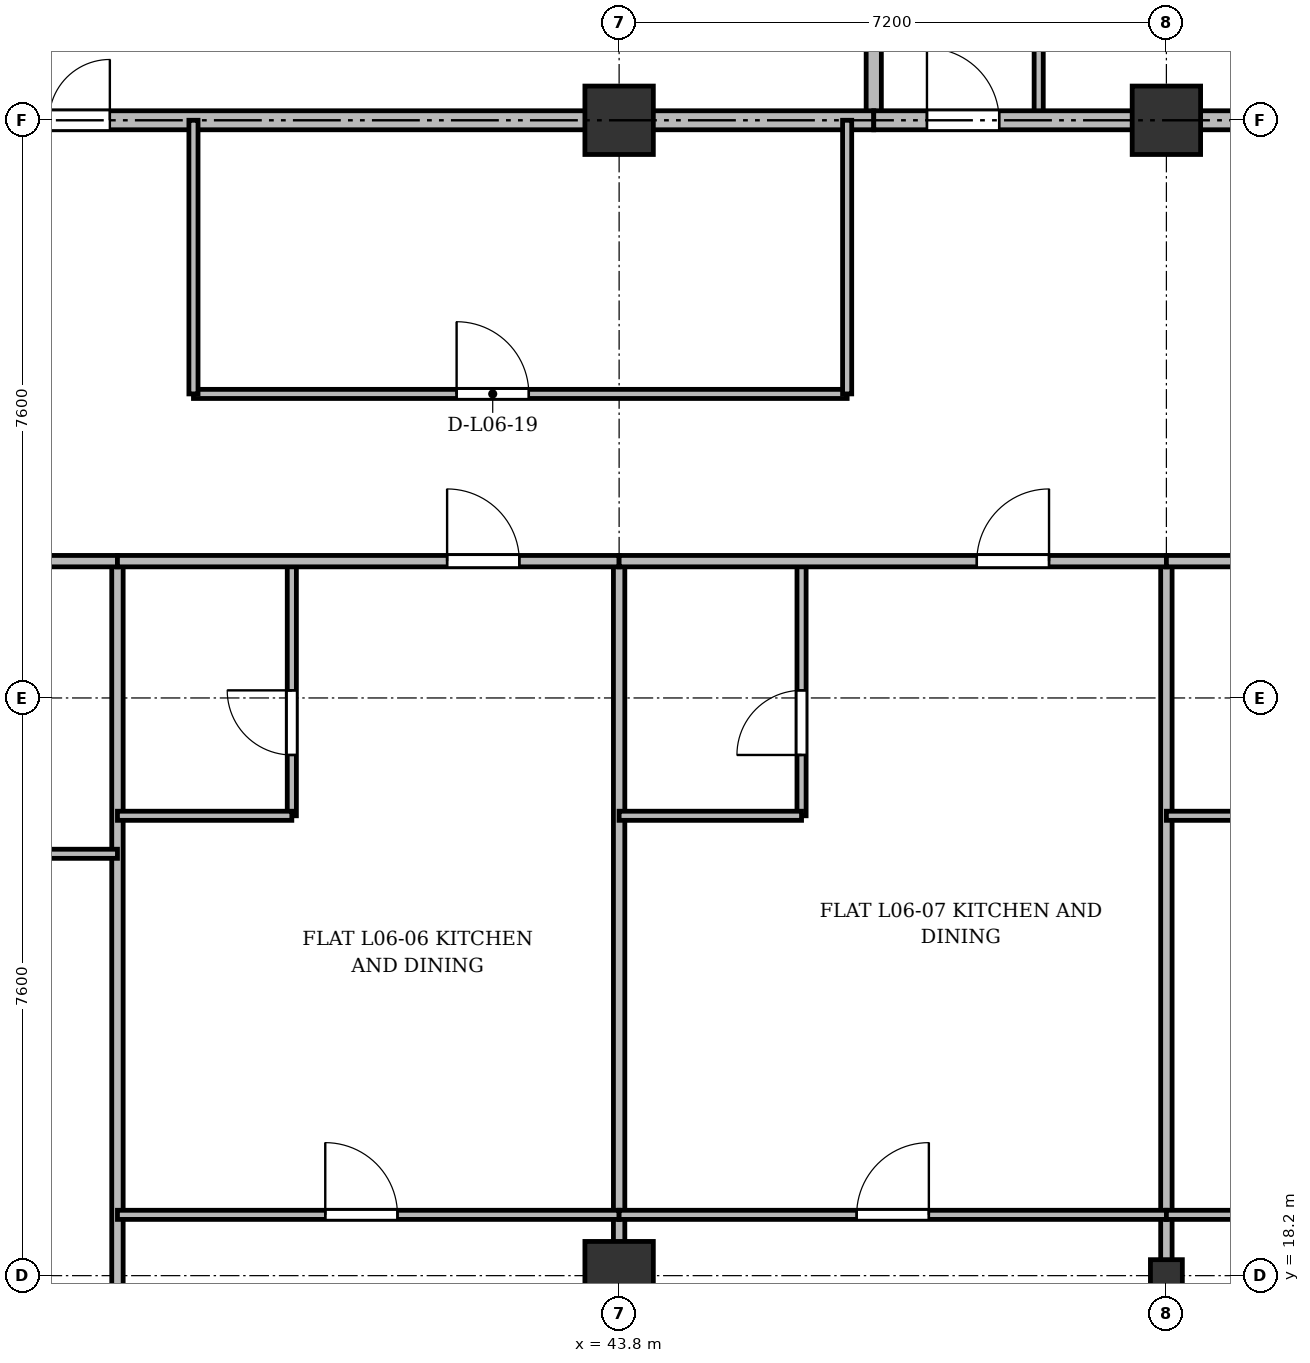
"""IFC4 building model, lengths in metres.
Left out: names, types, materials, properties, quantities, classifications, styles, units other than length and angle.
Written with IfcOpenShell. Run it as: python <this file> out.ifc"""

import sys

from ifc_helpers import new_model, si_unit, direction, frame, frame_2d, origin, origin_2d, place, context, subcontext, project, spatial, rectangle, i_section, extrude, source, transform, mapped, element, fill, save


model = new_model("IFC4")
c1 = context("Model", 3, precision=1e-05, world=origin(), true_north=direction((0.0, 1.0)))
c2 = subcontext(c1, "Body", "Model", "MODEL_VIEW")
j1 = project(units=[si_unit("LENGTHUNIT", "METRE"), si_unit("PLANEANGLEUNIT", "RADIAN")], contexts=[c1])
p1 = place(None, origin())
s1 = spatial("IfcSite", under=j1, at=p1, CompositionType="ELEMENT")
p2 = place(p1, origin())
s2 = spatial("IfcBuilding", under=s1, at=p2, CompositionType="ELEMENT")
p3 = place(p2, frame((0.0, 0.0, 27.1)))
s3 = spatial("IfcBuildingStorey", under=s2, at=p3, CompositionType="ELEMENT", Elevation=27.1)
m1 = source(origin(), c2, "Body", "SweptSolid", [
    extrude(rectangle(XDim=0.9, YDim=0.9, at=origin_2d()), origin(), (0.0, 0.0, 1.0), 3.6),
])
for number, where, z_axis, x_axis in (
    (1, (43.8, 18.2, 0.0), (0.0, 0.0, 1.0), (1.0, 0.0, 0.0)),
    (2, (43.8, 33.4, 0.0), (0.0, 0.0, 1.0), (1.0, 0.0, 0.0)),
):
    element("IfcColumn", number, at=place(p3, frame(where, z_axis=z_axis, x_axis=x_axis)), inside=s3, PredefinedType="COLUMN", context=c2, shape_type="MappedRepresentation", body=[
        mapped(m1, transform((0.0, 0.0, 0.0), x_axis=(1.0, 0.0, 0.0), y_axis=(0.0, 1.0, 0.0), z_axis=(0.0, 0.0, 1.0), scale=1.0)),
    ])
m2 = source(origin(), c2, "Body", "SweptSolid", [
    extrude(i_section(OverallWidth=0.42, OverallDepth=0.42, WebThickness=0.026, FlangeThickness=0.04, at=origin_2d()), origin(), (0.0, 0.0, 1.0), 3.6),
])
p4 = place(p3, frame((51.0, 18.2, 0.0), z_axis=(0.0, 0.0, 1.0), x_axis=(1.0, 0.0, 0.0)))
e3 = element("IfcColumn", 3, at=p4, inside=s3, PredefinedType="COLUMN", context=c2, shape_type="MappedRepresentation", body=[
    mapped(m2, transform((0.0, 0.0, 0.0), x_axis=(1.0, 0.0, 0.0), y_axis=(0.0, 1.0, 0.0), z_axis=(0.0, 0.0, 1.0), scale=1.0)),
])
p5 = place(p3, frame((51.0, 33.4, 0.0), z_axis=(0.0, 0.0, 1.0), x_axis=(1.0, 0.0, 0.0)))
e4 = element("IfcColumn", 4, at=p5, inside=s3, PredefinedType="COLUMN", context=c2, shape_type="MappedRepresentation", body=[
    mapped(m1, transform((0.0, 0.0, 0.0), x_axis=(1.0, 0.0, 0.0), y_axis=(0.0, 1.0, 0.0), z_axis=(0.0, 0.0, 1.0), scale=1.0)),
])
p6 = place(p3, frame((47.15, 33.4, 0.0), z_axis=(0.0, 0.0, 1.0), x_axis=(0.0, 1.0, 0.0)))
e5 = element("IfcWall", 5, at=p6, inside=s3, PredefinedType="SOLIDWALL", context=c2, shape_type="SweptSolid", body=[
    extrude(rectangle(XDim=11.3, YDim=0.2, at=frame_2d((5.65, 0.0))), origin(), (0.0, 0.0, 1.0), 2.69),
])
p7 = place(p3, frame((26.3, 33.4, 0.0), z_axis=(0.0, 0.0, 1.0), x_axis=(1.0, 0.0, 0.0)))
e6 = element("IfcWall", 6, at=p7, inside=s3, PredefinedType="PARTITIONING", context=c2, shape_type="SweptSolid", body=[
    extrude(rectangle(XDim=20.85, YDim=0.25, at=frame_2d((10.425, 0.0))), origin(), (0.0, 0.0, 1.0), 2.69),
])
p8 = place(p7, frame((9.2, 0.0, 0.0)))
e7 = element("IfcOpeningElement", 7, at=p8, cuts=e6, PredefinedType="OPENING", context=c2, shape_type="SweptSolid", body=[
    extrude(rectangle(XDim=1.6, YDim=2.2, at=frame_2d((0.8, 1.1))), frame((0.0, 0.135, 0.0), z_axis=(0.0, -1.0, 0.0), x_axis=(1.0, 0.0, 0.0)), (0.0, 0.0, 1.0), 0.27),
])
p9 = place(p3, frame((49.32, 33.4, 0.0), z_axis=(0.0, 0.0, 1.0), x_axis=(0.0, 1.0, 0.0)))
e8 = element("IfcWall", 8, at=p9, inside=s3, PredefinedType="PARTITIONING", context=c2, shape_type="SweptSolid", body=[
    extrude(rectangle(XDim=5.42, YDim=0.12, at=frame_2d((2.71, 0.0))), origin(), (0.0, 0.0, 1.0), 2.69),
])
p10 = place(p9, frame((1.6, 0.0, 0.0)))
e9 = element("IfcOpeningElement", 9, at=p10, cuts=e8, PredefinedType="OPENING", context=c2, shape_type="SweptSolid", body=[
    extrude(rectangle(XDim=0.95, YDim=2.15, at=frame_2d((0.475, 1.075))), frame((0.0, 0.07, 0.0), z_axis=(0.0, -1.0, 0.0), x_axis=(1.0, 0.0, 0.0)), (0.0, 0.0, 1.0), 0.14),
])
p11 = place(p3, frame((47.15, 33.4, 0.0), z_axis=(0.0, 0.0, 1.0), x_axis=(1.0, 0.0, 0.0)))
e10 = element("IfcWall", 10, at=p11, inside=s3, PredefinedType="PARTITIONING", context=c2, shape_type="SweptSolid", body=[
    extrude(rectangle(XDim=11.15, YDim=0.25, at=frame_2d((5.575, 0.0))), origin(), (0.0, 0.0, 1.0), 2.69),
])
p12 = place(p11, frame((0.7, 0.0, 0.0)))
e11 = element("IfcOpeningElement", 11, at=p12, cuts=e10, PredefinedType="OPENING", context=c2, shape_type="SweptSolid", body=[
    extrude(rectangle(XDim=0.95, YDim=2.15, at=frame_2d((0.475, 1.075))), frame((0.0, 0.135, 0.0), z_axis=(0.0, -1.0, 0.0), x_axis=(1.0, 0.0, 0.0)), (0.0, 0.0, 1.0), 0.27),
])
p13 = place(p11, frame((6.0, 0.0, 0.0)))
e12 = element("IfcOpeningElement", 12, at=p13, cuts=e10, PredefinedType="OPENING", context=c2, shape_type="SweptSolid", body=[
    extrude(rectangle(XDim=1.2, YDim=2.15, at=frame_2d((0.6, 1.075))), frame((0.0, 0.135, 0.0), z_axis=(0.0, -1.0, 0.0), x_axis=(1.0, 0.0, 0.0)), (0.0, 0.0, 1.0), 0.27),
])
p14 = place(p3, frame((38.2, 29.8, 0.0), z_axis=(0.0, 0.0, 1.0), x_axis=(1.0, 0.0, 0.0)))
e13 = element("IfcWall", 13, at=p14, inside=s3, PredefinedType="PARTITIONING", context=c2, shape_type="SweptSolid", body=[
    extrude(rectangle(XDim=8.6, YDim=0.12, at=frame_2d((4.3, 0.0))), origin(), (0.0, 0.0, 1.0), 2.752),
])
p15 = place(p14, frame((3.462, 0.0, 0.0)))
e14 = element("IfcOpeningElement", 14, at=p15, cuts=e13, PredefinedType="OPENING", context=c2, shape_type="SweptSolid", body=[
    extrude(rectangle(XDim=0.95, YDim=2.15, at=frame_2d((0.475, 1.075))), frame((0.0, 0.07, 0.0), z_axis=(0.0, -1.0, 0.0), x_axis=(1.0, 0.0, 0.0)), (0.0, 0.0, 1.0), 0.14),
])
for number, where, z_axis, x_axis in (
    (15, (38.2, 29.8, 0.0), (0.0, 0.0, 1.0), (0.0, 1.0, 0.0)),
    (16, (46.8, 29.8, 0.0), (0.0, 0.0, 1.0), (0.0, 1.0, 0.0)),
):
    element("IfcWall", number, at=place(p3, frame(where, z_axis=z_axis, x_axis=x_axis)), inside=s3, PredefinedType="PARTITIONING", context=c2, shape_type="SweptSolid", body=[
        extrude(rectangle(XDim=3.6, YDim=0.12, at=frame_2d((1.8, 0.0))), origin(), (0.0, 0.0, 1.0), 2.69),
    ])
p16 = place(p3, frame((37.2, 3.145, 0.0), z_axis=(0.0, 0.0, 1.0), x_axis=(0.0, 1.0, 0.0)))
e17 = element("IfcWall", 17, at=p16, inside=s3, PredefinedType="PARTITIONING", context=c2, shape_type="SweptSolid", body=[
    extrude(rectangle(XDim=24.455, YDim=0.15, at=frame_2d((12.228, 0.0))), origin(), (0.0, 0.0, 1.0), 2.69),
])
for number, where, z_axis, x_axis in (
    (18, (43.8, 3.145, 0.0), (0.0, 0.0, 1.0), (0.0, 1.0, 0.0)),
    (19, (51.0, 3.145, 0.0), (0.0, 0.0, 1.0), (0.0, 1.0, 0.0)),
):
    element("IfcWall", number, at=place(p3, frame(where, z_axis=z_axis, x_axis=x_axis)), inside=s3, PredefinedType="PARTITIONING", context=c2, shape_type="SweptSolid", body=[
        extrude(rectangle(XDim=24.455, YDim=0.15, at=frame_2d((12.228, 0.0))), origin(), (0.0, 0.0, 1.0), 2.752),
    ])
p17 = place(p3, frame((30.6, 27.6, 0.0), z_axis=(0.0, 0.0, 1.0), x_axis=(1.0, 0.0, 0.0)))
e20 = element("IfcWall", 20, at=p17, inside=s3, PredefinedType="PARTITIONING", context=c2, shape_type="SweptSolid", body=[
    extrude(rectangle(XDim=6.6, YDim=0.15, at=frame_2d((3.3, 0.0))), origin(), (0.0, 0.0, 1.0), 2.752),
])
p18 = place(p17, frame((2.734, 0.0, 0.0)))
e21 = element("IfcOpeningElement", 21, at=p18, cuts=e20, PredefinedType="OPENING", context=c2, shape_type="SweptSolid", body=[
    extrude(rectangle(XDim=0.95, YDim=2.15, at=frame_2d((0.475, 1.075))), frame((0.0, 0.085, 0.0), z_axis=(0.0, -1.0, 0.0), x_axis=(1.0, 0.0, 0.0)), (0.0, 0.0, 1.0), 0.17),
])
p19 = place(p3, frame((30.6, 23.75, 0.0), z_axis=(0.0, 0.0, 1.0), x_axis=(1.0, 0.0, 0.0)))
e22 = element("IfcWall", 22, at=p19, inside=s3, PredefinedType="PARTITIONING", context=c2, shape_type="SweptSolid", body=[
    extrude(rectangle(XDim=6.6, YDim=0.12, at=frame_2d((3.3, 0.0))), origin(), (0.0, 0.0, 1.0), 2.752),
])
p20 = place(p19, frame((2.734, 0.0, 0.0)))
e23 = element("IfcOpeningElement", 23, at=p20, cuts=e22, PredefinedType="OPENING", context=c2, shape_type="SweptSolid", body=[
    extrude(rectangle(XDim=0.95, YDim=2.15, at=frame_2d((0.475, 1.075))), frame((0.0, 0.07, 0.0), z_axis=(0.0, -1.0, 0.0), x_axis=(1.0, 0.0, 0.0)), (0.0, 0.0, 1.0), 0.14),
])
p21 = place(p3, frame((37.2, 19.0, 0.0), z_axis=(0.0, 0.0, 1.0), x_axis=(1.0, 0.0, 0.0)))
e24 = element("IfcWall", 24, at=p21, inside=s3, PredefinedType="PARTITIONING", context=c2, shape_type="SweptSolid", body=[
    extrude(rectangle(XDim=6.6, YDim=0.12, at=frame_2d((3.3, 0.0))), origin(), (0.0, 0.0, 1.0), 2.752),
])
p22 = place(p21, frame((2.734, 0.0, 0.0)))
e25 = element("IfcOpeningElement", 25, at=p22, cuts=e24, PredefinedType="OPENING", context=c2, shape_type="SweptSolid", body=[
    extrude(rectangle(XDim=0.95, YDim=2.15, at=frame_2d((0.475, 1.075))), frame((0.0, 0.07, 0.0), z_axis=(0.0, -1.0, 0.0), x_axis=(1.0, 0.0, 0.0)), (0.0, 0.0, 1.0), 0.14),
])
p23 = place(p3, frame((39.494, 24.25, 0.0), z_axis=(0.0, 0.0, 1.0), x_axis=(0.0, 1.0, 0.0)))
e26 = element("IfcWall", 26, at=p23, inside=s3, PredefinedType="PARTITIONING", context=c2, shape_type="SweptSolid", body=[
    extrude(rectangle(XDim=3.35, YDim=0.12, at=frame_2d((1.675, 0.0))), origin(), (0.0, 0.0, 1.0), 2.94),
])
p24 = place(p23, frame((0.8, 0.0, 0.0)))
e27 = element("IfcOpeningElement", 27, at=p24, cuts=e26, PredefinedType="OPENING", context=c2, shape_type="SweptSolid", body=[
    extrude(rectangle(XDim=0.85, YDim=2.1, at=frame_2d((0.425, 1.05))), frame((0.0, 0.07, 0.0), z_axis=(0.0, -1.0, 0.0), x_axis=(1.0, 0.0, 0.0)), (0.0, 0.0, 1.0), 0.14),
])
p25 = place(p3, frame((37.2, 24.25, 0.0), z_axis=(0.0, 0.0, 1.0), x_axis=(1.0, 0.0, 0.0)))
e28 = element("IfcWall", 28, at=p25, inside=s3, PredefinedType="PARTITIONING", context=c2, shape_type="SweptSolid", body=[
    extrude(rectangle(XDim=2.294, YDim=0.12, at=frame_2d((1.147, 0.0))), origin(), (0.0, 0.0, 1.0), 3.34),
])
p26 = place(p3, frame((37.2, 27.6, 0.0), z_axis=(0.0, 0.0, 1.0), x_axis=(1.0, 0.0, 0.0)))
e29 = element("IfcWall", 29, at=p26, inside=s3, PredefinedType="PARTITIONING", context=c2, shape_type="SweptSolid", body=[
    extrude(rectangle(XDim=6.6, YDim=0.15, at=frame_2d((3.3, 0.0))), origin(), (0.0, 0.0, 1.0), 2.752),
])
p27 = place(p26, frame((4.337, 0.0, 0.0)))
e30 = element("IfcOpeningElement", 30, at=p27, cuts=e29, PredefinedType="OPENING", context=c2, shape_type="SweptSolid", body=[
    extrude(rectangle(XDim=0.95, YDim=2.15, at=frame_2d((0.475, 1.075))), frame((0.0, 0.085, 0.0), z_axis=(0.0, -1.0, 0.0), x_axis=(1.0, 0.0, 0.0)), (0.0, 0.0, 1.0), 0.17),
])
p28 = place(p3, frame((43.8, 19.0, 0.0), z_axis=(0.0, 0.0, 1.0), x_axis=(1.0, 0.0, 0.0)))
e31 = element("IfcWall", 31, at=p28, inside=s3, PredefinedType="PARTITIONING", context=c2, shape_type="SweptSolid", body=[
    extrude(rectangle(XDim=7.2, YDim=0.12, at=frame_2d((3.6, 0.0))), origin(), (0.0, 0.0, 1.0), 2.752),
])
p29 = place(p28, frame((3.125, 0.0, 0.0)))
e32 = element("IfcOpeningElement", 32, at=p29, cuts=e31, PredefinedType="OPENING", context=c2, shape_type="SweptSolid", body=[
    extrude(rectangle(XDim=0.95, YDim=2.15, at=frame_2d((0.475, 1.075))), frame((0.0, 0.07, 0.0), z_axis=(0.0, -1.0, 0.0), x_axis=(1.0, 0.0, 0.0)), (0.0, 0.0, 1.0), 0.14),
])
p30 = place(p3, frame((46.2, 24.25, 0.0), z_axis=(0.0, 0.0, 1.0), x_axis=(0.0, 1.0, 0.0)))
e33 = element("IfcWall", 33, at=p30, inside=s3, PredefinedType="PARTITIONING", context=c2, shape_type="SweptSolid", body=[
    extrude(rectangle(XDim=3.35, YDim=0.12, at=frame_2d((1.675, 0.0))), origin(), (0.0, 0.0, 1.0), 2.94),
])
p31 = place(p30, frame((0.8, 0.0, 0.0)))
e34 = element("IfcOpeningElement", 34, at=p31, cuts=e33, PredefinedType="OPENING", context=c2, shape_type="SweptSolid", body=[
    extrude(rectangle(XDim=0.85, YDim=2.1, at=frame_2d((0.425, 1.05))), frame((0.0, 0.07, 0.0), z_axis=(0.0, -1.0, 0.0), x_axis=(1.0, 0.0, 0.0)), (0.0, 0.0, 1.0), 0.14),
])
p32 = place(p3, frame((43.8, 24.25, 0.0), z_axis=(0.0, 0.0, 1.0), x_axis=(1.0, 0.0, 0.0)))
e35 = element("IfcWall", 35, at=p32, inside=s3, PredefinedType="PARTITIONING", context=c2, shape_type="SweptSolid", body=[
    extrude(rectangle(XDim=2.4, YDim=0.12, at=frame_2d((1.2, 0.0))), origin(), (0.0, 0.0, 1.0), 2.752),
])
p33 = place(p3, frame((43.8, 27.6, 0.0), z_axis=(0.0, 0.0, 1.0), x_axis=(1.0, 0.0, 0.0)))
e36 = element("IfcWall", 36, at=p33, inside=s3, PredefinedType="PARTITIONING", context=c2, shape_type="SweptSolid", body=[
    extrude(rectangle(XDim=7.2, YDim=0.15, at=frame_2d((3.6, 0.0))), origin(), (0.0, 0.0, 1.0), 2.752),
])
p34 = place(p33, frame((4.706, 0.0, 0.0)))
e37 = element("IfcOpeningElement", 37, at=p34, cuts=e36, PredefinedType="OPENING", context=c2, shape_type="SweptSolid", body=[
    extrude(rectangle(XDim=0.95, YDim=2.15, at=frame_2d((0.475, 1.075))), frame((0.0, 0.085, 0.0), z_axis=(0.0, -1.0, 0.0), x_axis=(1.0, 0.0, 0.0)), (0.0, 0.0, 1.0), 0.17),
])
p35 = place(p3, frame((51.0, 19.0, 0.0), z_axis=(0.0, 0.0, 1.0), x_axis=(1.0, 0.0, 0.0)))
e38 = element("IfcWall", 38, at=p35, inside=s3, PredefinedType="PARTITIONING", context=c2, shape_type="SweptSolid", body=[
    extrude(rectangle(XDim=7.8, YDim=0.12, at=frame_2d((3.9, 0.0))), origin(), (0.0, 0.0, 1.0), 2.752),
])
p36 = place(p35, frame((3.333, 0.0, 0.0)))
e39 = element("IfcOpeningElement", 39, at=p36, cuts=e38, PredefinedType="OPENING", context=c2, shape_type="SweptSolid", body=[
    extrude(rectangle(XDim=0.95, YDim=2.15, at=frame_2d((0.475, 1.075))), frame((0.0, 0.07, 0.0), z_axis=(0.0, -1.0, 0.0), x_axis=(1.0, 0.0, 0.0)), (0.0, 0.0, 1.0), 0.14),
])
p37 = place(p3, frame((51.0, 24.25, 0.0), z_axis=(0.0, 0.0, 1.0), x_axis=(1.0, 0.0, 0.0)))
e40 = element("IfcWall", 40, at=p37, inside=s3, PredefinedType="PARTITIONING", context=c2, shape_type="SweptSolid", body=[
    extrude(rectangle(XDim=2.4, YDim=0.12, at=frame_2d((1.2, 0.0))), origin(), (0.0, 0.0, 1.0), 2.752),
])
p38 = place(p3, frame((51.0, 27.6, 0.0), z_axis=(0.0, 0.0, 1.0), x_axis=(1.0, 0.0, 0.0)))
e41 = element("IfcWall", 41, at=p38, inside=s3, PredefinedType="PARTITIONING", context=c2, shape_type="SweptSolid", body=[
    extrude(rectangle(XDim=7.8, YDim=0.15, at=frame_2d((3.9, 0.0))), origin(), (0.0, 0.0, 1.0), 2.752),
])
p39 = place(p38, frame((5.172, 0.0, 0.0)))
e42 = element("IfcOpeningElement", 42, at=p39, cuts=e41, PredefinedType="OPENING", context=c2, shape_type="SweptSolid", body=[
    extrude(rectangle(XDim=0.95, YDim=2.15, at=frame_2d((0.475, 1.075))), frame((0.0, 0.085, 0.0), z_axis=(0.0, -1.0, 0.0), x_axis=(1.0, 0.0, 0.0)), (0.0, 0.0, 1.0), 0.17),
])
m3 = source(origin(), c2, "Body", "SweptSolid", [
    extrude(rectangle(XDim=1.6, YDim=2.2, at=frame_2d((0.8, 1.1))), frame((0.0, 0.025, 0.0), z_axis=(0.0, -1.0, 0.0), x_axis=(1.0, 0.0, 0.0)), (0.0, 0.0, 1.0), 0.05),
])
p40 = place(p8, origin())
e43 = element("IfcDoor", 43, at=p40, inside=s3, OperationType="DOUBLE_DOOR_SINGLE_SWING", PredefinedType="DOOR", context=c2, shape_type="MappedRepresentation", body=[
    mapped(m3, transform((0.0, 0.0, 0.0), x_axis=(1.0, 0.0, 0.0), y_axis=(0.0, 1.0, 0.0), z_axis=(0.0, 0.0, 1.0), scale=1.0)),
])
fill(e7, e43)
m4 = source(origin(), c2, "Body", "SweptSolid", [
    extrude(rectangle(XDim=0.95, YDim=2.15, at=frame_2d((0.475, 1.075))), frame((0.0, 0.025, 0.0), z_axis=(0.0, -1.0, 0.0), x_axis=(1.0, 0.0, 0.0)), (0.0, 0.0, 1.0), 0.05),
])
p41 = place(p12, origin())
e44 = element("IfcDoor", 44, at=p41, inside=s3, OperationType="SINGLE_SWING_LEFT", PredefinedType="DOOR", context=c2, shape_type="MappedRepresentation", body=[
    mapped(m4, transform((0.0, 0.0, 0.0), x_axis=(1.0, 0.0, 0.0), y_axis=(0.0, 1.0, 0.0), z_axis=(0.0, 0.0, 1.0), scale=1.0)),
])
fill(e11, e44)
p42 = place(p15, origin())
e45 = element("IfcDoor", 45, at=p42, inside=s3, OperationType="SINGLE_SWING_LEFT", PredefinedType="DOOR", context=c2, shape_type="MappedRepresentation", body=[
    mapped(m4, transform((0.0, 0.0, 0.0), x_axis=(1.0, 0.0, 0.0), y_axis=(0.0, 1.0, 0.0), z_axis=(0.0, 0.0, 1.0), scale=1.0)),
])
fill(e14, e45)
p43 = place(p22, origin())
e46 = element("IfcDoor", 46, at=p43, inside=s3, OperationType="SINGLE_SWING_LEFT", PredefinedType="DOOR", context=c2, shape_type="MappedRepresentation", body=[
    mapped(m4, transform((0.0, 0.0, 0.0), x_axis=(1.0, 0.0, 0.0), y_axis=(0.0, 1.0, 0.0), z_axis=(0.0, 0.0, 1.0), scale=1.0)),
])
fill(e25, e46)
m5 = source(origin(), c2, "Body", "SweptSolid", [
    extrude(rectangle(XDim=0.85, YDim=2.1, at=frame_2d((0.425, 1.05))), frame((0.0, 0.025, 0.0), z_axis=(0.0, -1.0, 0.0), x_axis=(1.0, 0.0, 0.0)), (0.0, 0.0, 1.0), 0.05),
])
p44 = place(p24, origin())
e47 = element("IfcDoor", 47, at=p44, inside=s3, OperationType="SINGLE_SWING_RIGHT", PredefinedType="DOOR", context=c2, shape_type="MappedRepresentation", body=[
    mapped(m5, transform((0.0, 0.0, 0.0), x_axis=(1.0, 0.0, 0.0), y_axis=(0.0, 1.0, 0.0), z_axis=(0.0, 0.0, 1.0), scale=1.0)),
])
fill(e27, e47)
p45 = place(p27, origin())
e48 = element("IfcDoor", 48, at=p45, inside=s3, OperationType="SINGLE_SWING_LEFT", PredefinedType="DOOR", context=c2, shape_type="MappedRepresentation", body=[
    mapped(m4, transform((0.0, 0.0, 0.0), x_axis=(1.0, 0.0, 0.0), y_axis=(0.0, 1.0, 0.0), z_axis=(0.0, 0.0, 1.0), scale=1.0)),
])
fill(e30, e48)
p46 = place(p29, origin())
e49 = element("IfcDoor", 49, at=p46, inside=s3, OperationType="SINGLE_SWING_RIGHT", PredefinedType="DOOR", context=c2, shape_type="MappedRepresentation", body=[
    mapped(m4, transform((0.0, 0.0, 0.0), x_axis=(1.0, 0.0, 0.0), y_axis=(0.0, 1.0, 0.0), z_axis=(0.0, 0.0, 1.0), scale=1.0)),
])
fill(e32, e49)
p47 = place(p31, origin())
e50 = element("IfcDoor", 50, at=p47, inside=s3, OperationType="SINGLE_SWING_LEFT", PredefinedType="DOOR", context=c2, shape_type="MappedRepresentation", body=[
    mapped(m5, transform((0.0, 0.0, 0.0), x_axis=(1.0, 0.0, 0.0), y_axis=(0.0, 1.0, 0.0), z_axis=(0.0, 0.0, 1.0), scale=1.0)),
])
fill(e34, e50)
p48 = place(p34, origin())
e51 = element("IfcDoor", 51, at=p48, inside=s3, OperationType="SINGLE_SWING_RIGHT", PredefinedType="DOOR", context=c2, shape_type="MappedRepresentation", body=[
    mapped(m4, transform((0.0, 0.0, 0.0), x_axis=(1.0, 0.0, 0.0), y_axis=(0.0, 1.0, 0.0), z_axis=(0.0, 0.0, 1.0), scale=1.0)),
])
fill(e37, e51)
save(model, sys.argv[1])
